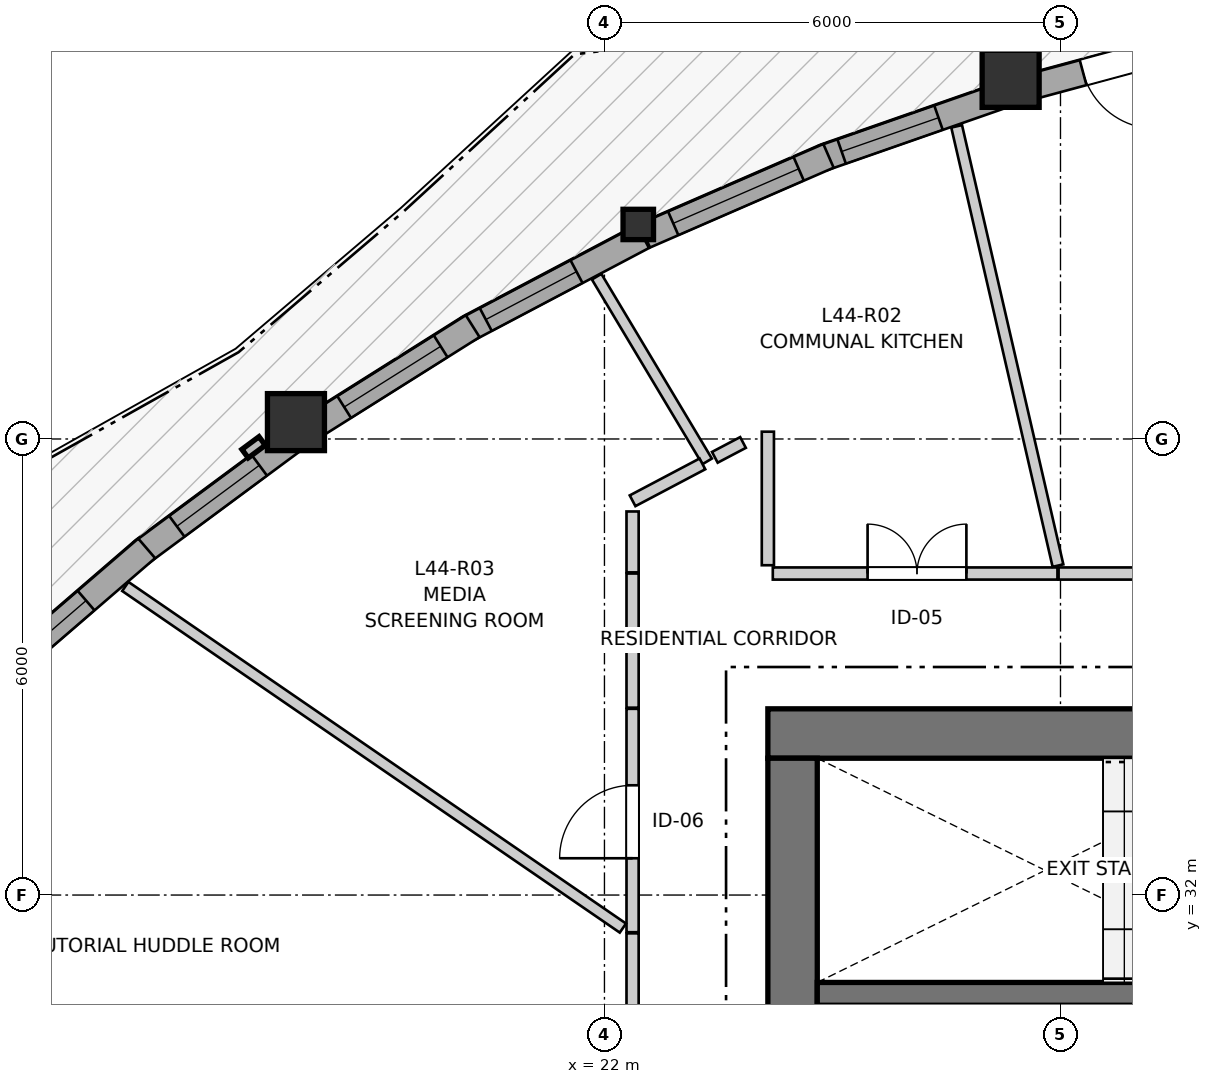
"""IFC4 building model, lengths in metres.
Left out: names, types, materials, properties, quantities, classifications, styles, units other than length and angle.
Written with IfcOpenShell. Run it as: python <this file> out.ifc"""

import sys

from ifc_helpers import new_model, si_unit, direction, frame, frame_2d, origin, origin_2d, place, context, subcontext, project, spatial, rectangle, i_section, extrude, source, transform, mapped, element, fill, save


model = new_model("IFC4")
c1 = context("Model", 3, precision=1e-05, world=origin(), true_north=direction((0.0, 1.0)))
c2 = subcontext(c1, "Body", "Model", "MODEL_VIEW")
j1 = project(units=[si_unit("LENGTHUNIT", "METRE"), si_unit("PLANEANGLEUNIT", "RADIAN")], contexts=[c1])
p1 = place(None, origin())
s1 = spatial("IfcSite", under=j1, at=p1, CompositionType="ELEMENT")
p2 = place(p1, origin())
s2 = spatial("IfcBuilding", under=s1, at=p2, CompositionType="ELEMENT")
p3 = place(p2, frame((0.0, 0.0, 149.0)))
s3 = spatial("IfcBuildingStorey", under=s2, at=p3, CompositionType="ELEMENT", Elevation=149.0)
p4 = place(p3, frame((36.55, 34.125, 0.0), z_axis=(0.0, 0.0, 1.0), x_axis=(-1.0, 0.0, 0.0)))
e1 = element("IfcWall", 1, at=p4, inside=s3, PredefinedType="SHEAR", context=c2, shape_type="SweptSolid", body=[
    extrude(rectangle(XDim=12.4, YDim=0.65, at=frame_2d((6.2, 0.0))), origin(), (0.0, 0.0, 1.0), 2.935),
])
p5 = place(p3, frame((24.475, 33.8, 0.0), z_axis=(0.0, 0.0, 1.0), x_axis=(0.0, -1.0, 0.0)))
e2 = element("IfcWall", 2, at=p5, inside=s3, PredefinedType="SHEAR", context=c2, shape_type="SweptSolid", body=[
    extrude(rectangle(XDim=15.6, YDim=0.65, at=frame_2d((7.8, 0.0))), origin(), (0.0, 0.0, 1.0), 2.935),
])
p6 = place(p5, frame((7.05, 0.0, 0.0)))
e3 = element("IfcOpeningElement", 3, at=p6, cuts=e2, PredefinedType="OPENING", context=c2, shape_type="SweptSolid", body=[
    extrude(rectangle(XDim=1.5, YDim=2.15, at=frame_2d((0.75, 1.075))), frame((0.0, 0.335, 0.0), z_axis=(0.0, -1.0, 0.0), x_axis=(1.0, 0.0, 0.0)), (0.0, 0.0, 1.0), 0.67),
])
p7 = place(p5, frame((3.52, 0.0, 0.0)))
e4 = element("IfcOpeningElement", 4, at=p7, cuts=e2, PredefinedType="OPENING", context=c2, shape_type="SweptSolid", body=[
    extrude(rectangle(XDim=0.86, YDim=2.05, at=frame_2d((0.43, 1.025))), frame((0.0, 0.335, 0.0), z_axis=(0.0, -1.0, 0.0), x_axis=(1.0, 0.0, 0.0)), (0.0, 0.0, 1.0), 0.67),
])
p8 = place(p5, frame((11.22, 0.0, 0.0)))
e5 = element("IfcOpeningElement", 5, at=p8, cuts=e2, PredefinedType="OPENING", context=c2, shape_type="SweptSolid", body=[
    extrude(rectangle(XDim=0.86, YDim=2.05, at=frame_2d((0.43, 1.025))), frame((0.0, 0.335, 0.0), z_axis=(0.0, -1.0, 0.0), x_axis=(1.0, 0.0, 0.0)), (0.0, 0.0, 1.0), 0.67),
])
p9 = place(p3, frame((24.8, 30.7, 0.0), z_axis=(0.0, 0.0, 1.0), x_axis=(1.0, 0.0, 0.0)))
e6 = element("IfcWall", 6, at=p9, inside=s3, PredefinedType="SHEAR", context=c2, shape_type="SweptSolid", body=[
    extrude(rectangle(XDim=11.1, YDim=0.3, at=frame_2d((5.55, 0.0))), origin(), (0.0, 0.0, 1.0), 2.935),
])
p10 = place(p9, frame((6.22, 0.0, 0.0)))
e7 = element("IfcOpeningElement", 7, at=p10, cuts=e6, PredefinedType="OPENING", context=c2, shape_type="SweptSolid", body=[
    extrude(rectangle(XDim=0.98, YDim=2.15, at=frame_2d((0.49, 1.075))), frame((0.0, 0.16, 0.0), z_axis=(0.0, -1.0, 0.0), x_axis=(1.0, 0.0, 0.0)), (0.0, 0.0, 1.0), 0.32),
])
p11 = place(p9, frame((9.15, 0.0, 0.0)))
e8 = element("IfcOpeningElement", 8, at=p11, cuts=e6, PredefinedType="OPENING", context=c2, shape_type="SweptSolid", body=[
    extrude(rectangle(XDim=1.15, YDim=2.15, at=frame_2d((0.575, 1.075))), frame((0.0, 0.16, 0.0), z_axis=(0.0, -1.0, 0.0), x_axis=(1.0, 0.0, 0.0)), (0.0, 0.0, 1.0), 0.32),
])
m1 = source(origin(), c2, "Body", "SweptSolid", [
    extrude(rectangle(XDim=0.75, YDim=0.75, at=origin_2d()), origin(), (0.0, 0.0, 1.0), 2.935),
])
p12 = place(p3, frame((27.344, 42.738, 0.0), z_axis=(0.0, 0.0, 1.0), x_axis=(1.0, 0.0, 0.0)))
e9 = element("IfcColumn", 9, at=p12, inside=s3, PredefinedType="COLUMN", context=c2, shape_type="MappedRepresentation", body=[
    mapped(m1, transform((0.0, 0.0, 0.0), x_axis=(1.0, 0.0, 0.0), y_axis=(0.0, 1.0, 0.0), z_axis=(0.0, 0.0, 1.0), scale=1.0)),
])
m2 = source(origin(), c2, "Body", "SweptSolid", [
    extrude(i_section(OverallWidth=0.401, OverallDepth=0.399, WebThickness=0.023, FlangeThickness=0.036, FilletRadius=0.015, at=origin_2d()), origin(), (0.0, 0.0, 1.0), 2.935),
])
p13 = place(p3, frame((22.445, 40.822, 0.0), z_axis=(0.0, 0.0, 1.0), x_axis=(1.0, 0.0, 0.0)))
e10 = element("IfcColumn", 10, at=p13, inside=s3, PredefinedType="PILASTER", context=c2, shape_type="MappedRepresentation", body=[
    mapped(m2, transform((0.0, 0.0, 0.0), x_axis=(1.0, 0.0, 0.0), y_axis=(0.0, 1.0, 0.0), z_axis=(0.0, 0.0, 1.0), scale=1.0)),
])
p14 = place(p3, frame((17.941, 38.222, 0.0), z_axis=(0.0, 0.0, 1.0), x_axis=(1.0, 0.0, 0.0)))
e11 = element("IfcColumn", 11, at=p14, inside=s3, PredefinedType="COLUMN", context=c2, shape_type="MappedRepresentation", body=[
    mapped(m1, transform((0.0, 0.0, 0.0), x_axis=(1.0, 0.0, 0.0), y_axis=(0.0, 1.0, 0.0), z_axis=(0.0, 0.0, 1.0), scale=1.0)),
])
p15 = place(p3, frame((30.023, 43.285, 0.0), z_axis=(0.0, 0.0, 1.0), x_axis=(-0.965478241218, -0.260483714913, 0.0)))
e12 = element("IfcWall", 12, at=p15, inside=s3, PredefinedType="SOLIDWALL", context=c2, shape_type="SweptSolid", body=[
    extrude(rectangle(XDim=2.574, YDim=0.34, at=frame_2d((1.287, 0.0))), origin(), (0.0, 0.0, 1.0), 2.515),
])
p16 = place(p15, frame((0.787, 0.0, 0.0)))
e13 = element("IfcOpeningElement", 13, at=p16, cuts=e12, PredefinedType="OPENING", context=c2, shape_type="SweptSolid", body=[
    extrude(rectangle(XDim=1.0, YDim=2.1, at=frame_2d((0.5, 1.05))), frame((0.0, 0.18, 0.0), z_axis=(0.0, -1.0, 0.0), x_axis=(1.0, 0.0, 0.0)), (0.0, 0.0, 1.0), 0.36),
])
p17 = place(p3, frame((27.254, 42.527, 0.0), z_axis=(0.0, 0.0, 1.0), x_axis=(-0.944140843313, -0.329542209721, 0.0)))
e14 = element("IfcWall", 14, at=p17, inside=s3, PredefinedType="SOLIDWALL", context=c2, shape_type="SweptSolid", body=[
    extrude(rectangle(XDim=2.53, YDim=0.34, at=frame_2d((1.265, 0.0))), origin(), (0.0, 0.0, 1.0), 2.515),
])
p18 = place(p17, frame((0.909, 0.0, 0.82)))
e15 = element("IfcOpeningElement", 15, at=p18, cuts=e14, PredefinedType="OPENING", context=c2, shape_type="SweptSolid", body=[
    extrude(rectangle(XDim=1.35, YDim=1.45, at=frame_2d((0.675, 0.725))), frame((0.0, 0.18, 0.0), z_axis=(0.0, -1.0, 0.0), x_axis=(1.0, 0.0, 0.0)), (0.0, 0.0, 1.0), 0.36),
])
p19 = place(p3, frame((24.948, 41.725, 0.0), z_axis=(0.0, 0.0, 1.0), x_axis=(-0.917067110524, -0.398732886523, 0.0)))
e16 = element("IfcWall", 16, at=p19, inside=s3, PredefinedType="SOLIDWALL", context=c2, shape_type="SweptSolid", body=[
    extrude(rectangle(XDim=2.635, YDim=0.34, at=frame_2d((1.318, 0.0))), origin(), (0.0, 0.0, 1.0), 2.515),
])
p20 = place(p19, frame((0.427, 0.0, 0.82)))
e17 = element("IfcOpeningElement", 17, at=p20, cuts=e16, PredefinedType="OPENING", context=c2, shape_type="SweptSolid", body=[
    extrude(rectangle(XDim=1.8, YDim=1.45, at=frame_2d((0.9, 0.725))), frame((0.0, 0.18, 0.0), z_axis=(0.0, -1.0, 0.0), x_axis=(1.0, 0.0, 0.0)), (0.0, 0.0, 1.0), 0.36),
])
p21 = place(p3, frame((22.507, 40.663, 0.0), z_axis=(0.0, 0.0, 1.0), x_axis=(-0.884410392718, -0.466710035517, 0.0)))
e18 = element("IfcWall", 18, at=p21, inside=s3, PredefinedType="SOLIDWALL", context=c2, shape_type="SweptSolid", body=[
    extrude(rectangle(XDim=2.62, YDim=0.34, at=frame_2d((1.31, 0.0))), origin(), (0.0, 0.0, 1.0), 2.515),
])
p22 = place(p21, frame((0.988, 0.0, 0.82)))
e19 = element("IfcOpeningElement", 19, at=p22, cuts=e18, PredefinedType="OPENING", context=c2, shape_type="SweptSolid", body=[
    extrude(rectangle(XDim=1.35, YDim=1.45, at=frame_2d((0.675, 0.725))), frame((0.0, 0.18, 0.0), z_axis=(0.0, -1.0, 0.0), x_axis=(1.0, 0.0, 0.0)), (0.0, 0.0, 1.0), 0.36),
])
p23 = place(p3, frame((20.266, 39.484, 0.0), z_axis=(0.0, 0.0, 1.0), x_axis=(-0.84647717658, -0.532425008363, 0.0)))
e20 = element("IfcWall", 20, at=p23, inside=s3, PredefinedType="SOLIDWALL", context=c2, shape_type="SweptSolid", body=[
    extrude(rectangle(XDim=2.485, YDim=0.34, at=frame_2d((1.243, 0.0))), origin(), (0.0, 0.0, 1.0), 2.515),
])
p24 = place(p23, frame((0.498, 0.0, 0.82)))
e21 = element("IfcOpeningElement", 21, at=p24, cuts=e20, PredefinedType="OPENING", context=c2, shape_type="SweptSolid", body=[
    extrude(rectangle(XDim=1.5, YDim=1.45, at=frame_2d((0.75, 0.725))), frame((0.0, 0.18, 0.0), z_axis=(0.0, -1.0, 0.0), x_axis=(1.0, 0.0, 0.0)), (0.0, 0.0, 1.0), 0.36),
])
p25 = place(p3, frame((17.917, 37.993, 0.0), z_axis=(0.0, 0.0, 1.0), x_axis=(-0.803792400414, -0.594909889846, 0.0)))
e22 = element("IfcWall", 22, at=p25, inside=s3, PredefinedType="SOLIDWALL", context=c2, shape_type="SweptSolid", body=[
    extrude(rectangle(XDim=2.5, YDim=0.34, at=frame_2d((1.25, 0.0))), origin(), (0.0, 0.0, 1.0), 2.515),
])
p26 = place(p25, frame((0.57, 0.0, 0.82)))
e23 = element("IfcOpeningElement", 23, at=p26, cuts=e22, PredefinedType="OPENING", context=c2, shape_type="SweptSolid", body=[
    extrude(rectangle(XDim=1.35, YDim=1.45, at=frame_2d((0.675, 0.725))), frame((0.0, 0.18, 0.0), z_axis=(0.0, -1.0, 0.0), x_axis=(1.0, 0.0, 0.0)), (0.0, 0.0, 1.0), 0.36),
])
p27 = place(p3, frame((15.977, 36.561, 0.0), z_axis=(0.0, 0.0, 1.0), x_axis=(-0.757481825022, -0.652856251223, 0.0)))
e24 = element("IfcWall", 24, at=p27, inside=s3, PredefinedType="SOLIDWALL", context=c2, shape_type="SweptSolid", body=[
    extrude(rectangle(XDim=2.665, YDim=0.34, at=frame_2d((1.333, 0.0))), origin(), (0.0, 0.0, 1.0), 2.515),
])
p28 = place(p27, frame((1.052, 0.0, 0.82)))
e25 = element("IfcOpeningElement", 25, at=p28, cuts=e24, PredefinedType="OPENING", context=c2, shape_type="SweptSolid", body=[
    extrude(rectangle(XDim=1.05, YDim=1.45, at=frame_2d((0.525, 0.725))), frame((0.0, 0.18, 0.0), z_axis=(0.0, -1.0, 0.0), x_axis=(1.0, 0.0, 0.0)), (0.0, 0.0, 1.0), 0.36),
])
p29 = place(p3, frame((27.975, 36.23, 0.0), z_axis=(0.0, 0.0, 1.0), x_axis=(1.0, 0.0, 0.0)))
e26 = element("IfcWall", 26, at=p29, inside=s3, PredefinedType="PARTITIONING", context=c2, shape_type="SweptSolid", body=[
    extrude(rectangle(XDim=5.775, YDim=0.16, at=frame_2d((2.887, 0.0))), origin(), (0.0, 0.0, 1.0), 2.573),
])
p30 = place(p29, frame((2.407, 0.0, 0.0)))
e27 = element("IfcOpeningElement", 27, at=p30, cuts=e26, PredefinedType="OPENING", context=c2, shape_type="SweptSolid", body=[
    extrude(rectangle(XDim=0.96, YDim=2.1, at=frame_2d((0.48, 1.05))), frame((0.0, 0.09, 0.0), z_axis=(0.0, -1.0, 0.0), x_axis=(1.0, 0.0, 0.0)), (0.0, 0.0, 1.0), 0.18),
])
p31 = place(p3, frame((24.215, 36.23, 0.0), z_axis=(0.0, 0.0, 1.0), x_axis=(1.0, 0.0, 0.0)))
e28 = element("IfcWall", 28, at=p31, inside=s3, PredefinedType="PARTITIONING", context=c2, shape_type="SweptSolid", body=[
    extrude(rectangle(XDim=3.745, YDim=0.16, at=frame_2d((1.873, 0.0))), origin(), (0.0, 0.0, 1.0), 2.935),
])
p32 = place(p31, frame((1.247, 0.0, 0.0)))
e29 = element("IfcOpeningElement", 29, at=p32, cuts=e28, PredefinedType="OPENING", context=c2, shape_type="SweptSolid", body=[
    extrude(rectangle(XDim=1.3, YDim=2.1, at=frame_2d((0.65, 1.05))), frame((0.0, 0.09, 0.0), z_axis=(0.0, -1.0, 0.0), x_axis=(1.0, 0.0, 0.0)), (0.0, 0.0, 1.0), 0.18),
])
p33 = place(p3, frame((22.37, 27.85, 0.0), z_axis=(0.0, 0.0, 1.0), x_axis=(0.0, 1.0, 0.0)))
e30 = element("IfcWall", 30, at=p33, inside=s3, PredefinedType="PARTITIONING", context=c2, shape_type="SweptSolid", body=[
    extrude(rectangle(XDim=3.646, YDim=0.16, at=frame_2d((1.823, 0.0))), origin(), (0.0, 0.0, 1.0), 2.935),
])
p34 = place(p33, frame((1.194, 0.0, 0.0)))
e31 = element("IfcOpeningElement", 31, at=p34, cuts=e30, PredefinedType="OPENING", context=c2, shape_type="SweptSolid", body=[
    extrude(rectangle(XDim=1.3, YDim=2.1, at=frame_2d((0.65, 1.05))), frame((0.0, 0.09, 0.0), z_axis=(0.0, -1.0, 0.0), x_axis=(1.0, 0.0, 0.0)), (0.0, 0.0, 1.0), 0.18),
])
p35 = place(p3, frame((22.37, 31.511, 0.0), z_axis=(0.0, 0.0, 1.0), x_axis=(0.0, 1.0, 0.0)))
e32 = element("IfcWall", 32, at=p35, inside=s3, PredefinedType="PARTITIONING", context=c2, shape_type="SweptSolid", body=[
    extrude(rectangle(XDim=2.939, YDim=0.16, at=frame_2d((1.469, 0.0))), origin(), (0.0, 0.0, 1.0), 2.935),
])
p36 = place(p35, frame((0.973, 0.0, 0.0)))
e33 = element("IfcOpeningElement", 33, at=p36, cuts=e32, PredefinedType="OPENING", context=c2, shape_type="SweptSolid", body=[
    extrude(rectangle(XDim=0.96, YDim=2.1, at=frame_2d((0.48, 1.05))), frame((0.0, 0.09, 0.0), z_axis=(0.0, -1.0, 0.0), x_axis=(1.0, 0.0, 0.0)), (0.0, 0.0, 1.0), 0.18),
])
p37 = place(p3, frame((15.696, 36.06, 0.0), z_axis=(0.0, 0.0, 1.0), x_axis=(0.824423900824, -0.565972818914, 0.0)))
e34 = element("IfcWall", 34, at=p37, inside=s3, PredefinedType="PARTITIONING", context=c2, shape_type="SweptSolid", body=[
    extrude(rectangle(XDim=7.941, YDim=0.145, at=frame_2d((3.97, 0.0))), origin(), (0.0, 0.0, 1.0), 2.935),
])
p38 = place(p3, frame((26.634, 42.113, 0.0), z_axis=(0.0, 0.0, 1.0), x_axis=(0.224790361783, -0.97440714963, 0.0)))
e35 = element("IfcWall", 35, at=p38, inside=s3, PredefinedType="PARTITIONING", context=c2, shape_type="SweptSolid", body=[
    extrude(rectangle(XDim=5.931, YDim=0.145, at=frame_2d((2.966, 0.0))), origin(), (0.0, 0.0, 1.0), 2.935),
])
p39 = place(p3, frame((21.897, 40.135, 0.0), z_axis=(0.0, 0.0, 1.0), x_axis=(0.513392323606, -0.858154020012, 0.0)))
e36 = element("IfcWall", 36, at=p39, inside=s3, PredefinedType="PARTITIONING", context=c2, shape_type="SweptSolid", body=[
    extrude(rectangle(XDim=2.832, YDim=0.145, at=frame_2d((1.416, 0.0))), origin(), (0.0, 0.0, 1.0), 2.935),
])
p40 = place(p3, frame((22.37, 34.465, 0.0), z_axis=(0.0, 0.0, 1.0), x_axis=(0.0, 1.0, 0.0)))
e37 = element("IfcWall", 37, at=p40, inside=s3, PredefinedType="PARTITIONING", context=c2, shape_type="SweptSolid", body=[
    extrude(rectangle(XDim=1.765, YDim=0.16, at=frame_2d((0.882, 0.0))), origin(), (0.0, 0.0, 1.0), 2.935),
])
p41 = place(p3, frame((24.15, 36.339, 0.0), z_axis=(0.0, 0.0, 1.0), x_axis=(0.0, 1.0, 0.0)))
e38 = element("IfcWall", 38, at=p41, inside=s3, PredefinedType="PARTITIONING", context=c2, shape_type="SweptSolid", body=[
    extrude(rectangle(XDim=1.757, YDim=0.16, at=frame_2d((0.878, 0.0))), origin(), (0.0, 0.0, 1.0), 2.935),
])
p42 = place(p3, frame((22.37, 37.187, 0.0), z_axis=(0.0, 0.0, 1.0), x_axis=(0.884244639112, 0.467024001741, 0.0)))
e39 = element("IfcWall", 39, at=p42, inside=s3, PredefinedType="PARTITIONING", context=c2, shape_type="SweptSolid", body=[
    extrude(rectangle(XDim=1.039, YDim=0.16, at=frame_2d((0.52, 0.0))), origin(), (0.0, 0.0, 1.0), 2.543),
])
p43 = place(p3, frame((22.37, 36.245, 0.0), z_axis=(0.0, 0.0, 1.0), x_axis=(0.0, 1.0, 0.0)))
e40 = element("IfcWall", 40, at=p43, inside=s3, PredefinedType="PARTITIONING", context=c2, shape_type="SweptSolid", body=[
    extrude(rectangle(XDim=0.801, YDim=0.16, at=frame_2d((0.401, 0.0))), origin(), (0.0, 0.0, 1.0), 2.935),
])
p44 = place(p3, frame((23.452, 37.759, 0.0), z_axis=(0.0, 0.0, 1.0), x_axis=(0.884665257528, 0.466226749686, 0.0)))
e41 = element("IfcWall", 41, at=p44, inside=s3, PredefinedType="PARTITIONING", context=c2, shape_type="SweptSolid", body=[
    extrude(rectangle(XDim=0.419, YDim=0.16, at=frame_2d((0.209, 0.0))), origin(), (0.0, 0.0, 1.0), 2.543),
])
m3 = source(origin(), c2, "Body", "SweptSolid", [
    extrude(rectangle(XDim=1.35, YDim=1.45, at=frame_2d((0.675, 0.725))), frame((0.0, 0.03, 0.0), z_axis=(0.0, -1.0, 0.0), x_axis=(1.0, 0.0, 0.0)), (0.0, 0.0, 1.0), 0.06),
])
p45 = place(p18, origin())
e42 = element("IfcWindow", 42, at=p45, inside=s3, PartitioningType="SINGLE_PANEL", PredefinedType="WINDOW", context=c2, shape_type="MappedRepresentation", body=[
    mapped(m3, transform((0.0, 0.0, 0.0), x_axis=(1.0, 0.0, 0.0), y_axis=(0.0, 1.0, 0.0), z_axis=(0.0, 0.0, 1.0), scale=1.0)),
])
fill(e15, e42)
m4 = source(origin(), c2, "Body", "SweptSolid", [
    extrude(rectangle(XDim=1.8, YDim=1.45, at=frame_2d((0.9, 0.725))), frame((0.0, 0.03, 0.0), z_axis=(0.0, -1.0, 0.0), x_axis=(1.0, 0.0, 0.0)), (0.0, 0.0, 1.0), 0.06),
])
p46 = place(p20, origin())
e43 = element("IfcWindow", 43, at=p46, inside=s3, PartitioningType="SINGLE_PANEL", PredefinedType="WINDOW", context=c2, shape_type="MappedRepresentation", body=[
    mapped(m4, transform((0.0, 0.0, 0.0), x_axis=(1.0, 0.0, 0.0), y_axis=(0.0, 1.0, 0.0), z_axis=(0.0, 0.0, 1.0), scale=1.0)),
])
fill(e17, e43)
p47 = place(p22, origin())
e44 = element("IfcWindow", 44, at=p47, inside=s3, PartitioningType="SINGLE_PANEL", PredefinedType="WINDOW", context=c2, shape_type="MappedRepresentation", body=[
    mapped(m3, transform((0.0, 0.0, 0.0), x_axis=(1.0, 0.0, 0.0), y_axis=(0.0, 1.0, 0.0), z_axis=(0.0, 0.0, 1.0), scale=1.0)),
])
fill(e19, e44)
m5 = source(origin(), c2, "Body", "SweptSolid", [
    extrude(rectangle(XDim=1.5, YDim=1.45, at=frame_2d((0.75, 0.725))), frame((0.0, 0.03, 0.0), z_axis=(0.0, -1.0, 0.0), x_axis=(1.0, 0.0, 0.0)), (0.0, 0.0, 1.0), 0.06),
])
p48 = place(p24, origin())
e45 = element("IfcWindow", 45, at=p48, inside=s3, PartitioningType="SINGLE_PANEL", PredefinedType="WINDOW", context=c2, shape_type="MappedRepresentation", body=[
    mapped(m5, transform((0.0, 0.0, 0.0), x_axis=(1.0, 0.0, 0.0), y_axis=(0.0, 1.0, 0.0), z_axis=(0.0, 0.0, 1.0), scale=1.0)),
])
fill(e21, e45)
p49 = place(p26, origin())
e46 = element("IfcWindow", 46, at=p49, inside=s3, PartitioningType="SINGLE_PANEL", PredefinedType="WINDOW", context=c2, shape_type="MappedRepresentation", body=[
    mapped(m3, transform((0.0, 0.0, 0.0), x_axis=(1.0, 0.0, 0.0), y_axis=(0.0, 1.0, 0.0), z_axis=(0.0, 0.0, 1.0), scale=1.0)),
])
fill(e23, e46)
m6 = source(origin(), c2, "Body", "SweptSolid", [
    extrude(rectangle(XDim=1.05, YDim=1.45, at=frame_2d((0.525, 0.725))), frame((0.0, 0.03, 0.0), z_axis=(0.0, -1.0, 0.0), x_axis=(1.0, 0.0, 0.0)), (0.0, 0.0, 1.0), 0.06),
])
p50 = place(p28, origin())
e47 = element("IfcWindow", 47, at=p50, inside=s3, PartitioningType="SINGLE_PANEL", PredefinedType="WINDOW", context=c2, shape_type="MappedRepresentation", body=[
    mapped(m6, transform((0.0, 0.0, 0.0), x_axis=(1.0, 0.0, 0.0), y_axis=(0.0, 1.0, 0.0), z_axis=(0.0, 0.0, 1.0), scale=1.0)),
])
fill(e25, e47)
m7 = source(origin(), c2, "Body", "SweptSolid", [
    extrude(rectangle(XDim=1.0, YDim=2.1, at=frame_2d((0.5, 1.05))), frame((0.0, 0.025, 0.0), z_axis=(0.0, -1.0, 0.0), x_axis=(1.0, 0.0, 0.0)), (0.0, 0.0, 1.0), 0.05),
])
p51 = place(p16, origin())
e48 = element("IfcDoor", 48, at=p51, inside=s3, OperationType="SINGLE_SWING_LEFT", PredefinedType="DOOR", context=c2, shape_type="MappedRepresentation", body=[
    mapped(m7, transform((0.0, 0.0, 0.0), x_axis=(1.0, 0.0, 0.0), y_axis=(0.0, 1.0, 0.0), z_axis=(0.0, 0.0, 1.0), scale=1.0)),
])
fill(e13, e48)
m8 = source(origin(), c2, "Body", "SweptSolid", [
    extrude(rectangle(XDim=1.3, YDim=2.1, at=frame_2d((0.65, 1.05))), frame((0.0, 0.025, 0.0), z_axis=(0.0, -1.0, 0.0), x_axis=(1.0, 0.0, 0.0)), (0.0, 0.0, 1.0), 0.05),
])
p52 = place(p32, origin())
e49 = element("IfcDoor", 49, at=p52, inside=s3, OperationType="DOUBLE_DOOR_SINGLE_SWING", PredefinedType="DOOR", context=c2, shape_type="MappedRepresentation", body=[
    mapped(m8, transform((0.0, 0.0, 0.0), x_axis=(1.0, 0.0, 0.0), y_axis=(0.0, 1.0, 0.0), z_axis=(0.0, 0.0, 1.0), scale=1.0)),
])
fill(e29, e49)
m9 = source(origin(), c2, "Body", "SweptSolid", [
    extrude(rectangle(XDim=0.96, YDim=2.1, at=frame_2d((0.48, 1.05))), frame((0.0, 0.025, 0.0), z_axis=(0.0, -1.0, 0.0), x_axis=(1.0, 0.0, 0.0)), (0.0, 0.0, 1.0), 0.05),
])
p53 = place(p36, origin())
e50 = element("IfcDoor", 50, at=p53, inside=s3, OperationType="SINGLE_SWING_LEFT", PredefinedType="DOOR", context=c2, shape_type="MappedRepresentation", body=[
    mapped(m9, transform((0.0, 0.0, 0.0), x_axis=(1.0, 0.0, 0.0), y_axis=(0.0, 1.0, 0.0), z_axis=(0.0, 0.0, 1.0), scale=1.0)),
])
fill(e33, e50)
save(model, sys.argv[1])
